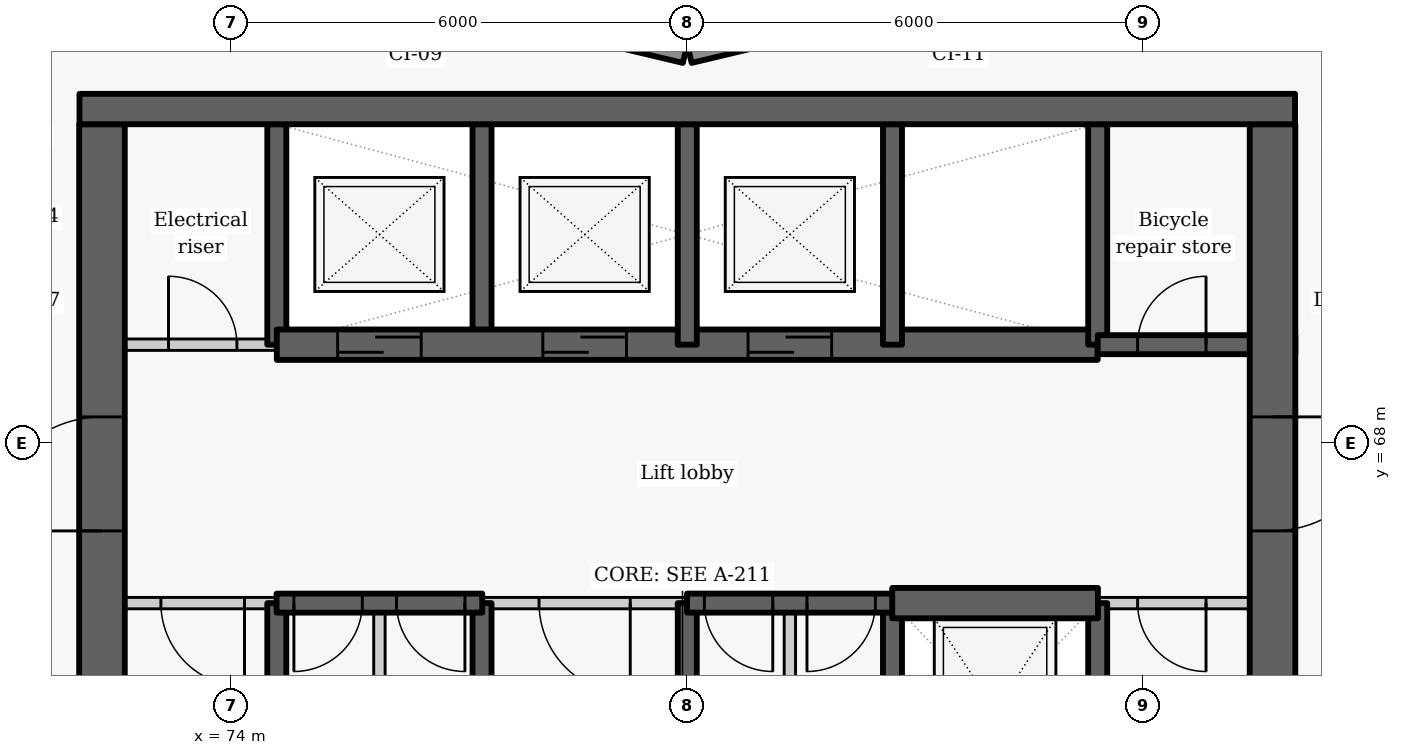
"""IFC4 building model, lengths in metres.
Left out: names, types, materials, properties, quantities, classifications, styles, units other than length and angle.
Written with IfcOpenShell. Run it as: python <this file> out.ifc"""

import sys

from ifc_helpers import new_model, si_unit, direction, frame, frame_2d, origin, place, context, subcontext, project, spatial, rectangle, extrude, element, fill, save


model = new_model("IFC4")
c1 = context("Model", 3, precision=1e-05, world=origin(), true_north=direction((0.0, 1.0)))
c2 = subcontext(c1, "Body", "Model", "MODEL_VIEW")
j1 = project(units=[si_unit("LENGTHUNIT", "METRE"), si_unit("PLANEANGLEUNIT", "RADIAN")], contexts=[c1])
p1 = place(None, origin())
s1 = spatial("IfcSite", under=j1, at=p1, CompositionType="ELEMENT")
p2 = place(p1, origin())
s2 = spatial("IfcBuilding", under=s1, at=p2, CompositionType="ELEMENT")
p3 = place(p2, frame((0.0, 0.0, 41.4)))
s3 = spatial("IfcBuildingStorey", under=s2, at=p3, CompositionType="ELEMENT", Elevation=41.4)
for number, where, z_axis, x_axis in (
    (1, (83.186, 73.881, 0.0), (0.0, 0.0, 1.0), (-0.973, -0.232, 0.0)),
    (2, (79.971, 73.128, 0.0), (0.0, 0.0, 1.0), (-0.973, 0.232, 0.0)),
):
    element("IfcWall", number, at=place(p3, frame(where, z_axis=z_axis, x_axis=x_axis)), inside=s3, PredefinedType="SOLIDWALL", context=c2, shape_type="SweptSolid", body=[
        extrude(rectangle(XDim=3.246, YDim=0.25, at=frame_2d((1.623, 0.0))), origin(), (0.0, 0.0, 1.0), 2.425),
    ])
p4 = place(p3, frame((74.6, 63.1, -0.275), z_axis=(0.0, 0.0, 1.0), x_axis=(0.0, 1.0, 0.0)))
e3 = element("IfcWall", 3, at=p4, inside=s3, PredefinedType="SHEAR", context=c2, shape_type="SweptSolid", body=[
    extrude(rectangle(XDim=2.8, YDim=0.25, at=frame_2d((1.4, 0.0))), origin(), (0.0, 0.0, 1.0), 3.3),
])
p5 = place(p3, frame((74.6, 69.3, -0.275), z_axis=(0.0, 0.0, 1.0), x_axis=(0.0, 1.0, 0.0)))
e4 = element("IfcWall", 4, at=p5, inside=s3, PredefinedType="SHEAR", context=c2, shape_type="SweptSolid", body=[
    extrude(rectangle(XDim=2.9, YDim=0.25, at=frame_2d((1.45, 0.0))), origin(), (0.0, 0.0, 1.0), 3.3),
])
p6 = place(p3, frame((72.0, 69.3, 0.0), z_axis=(0.0, 0.0, 1.0), x_axis=(1.0, 0.0, 0.0)))
e5 = element("IfcWall", 5, at=p6, inside=s3, PredefinedType="PARTITIONING", context=c2, shape_type="SweptSolid", body=[
    extrude(rectangle(XDim=2.6, YDim=0.15, at=frame_2d((1.3, 0.0))), origin(), (0.0, 0.0, 1.0), 3.025),
])
p7 = place(p6, frame((1.175, 0.0, 0.0)))
e6 = element("IfcOpeningElement", 6, at=p7, cuts=e5, PredefinedType="OPENING", context=c2, shape_type="SweptSolid", body=[
    extrude(rectangle(XDim=0.9, YDim=2.1, at=frame_2d((0.45, 1.05))), frame((0.0, 0.085, 0.0), z_axis=(0.0, -1.0, 0.0), x_axis=(1.0, 0.0, 0.0)), (0.0, 0.0, 1.0), 0.17),
])
p8 = place(p3, frame((72.3, 63.1, -0.275), z_axis=(0.0, 0.0, 1.0), x_axis=(0.0, 1.0, 0.0)))
e7 = element("IfcWall", 7, at=p8, inside=s3, PredefinedType="SHEAR", context=c2, shape_type="SweptSolid", body=[
    extrude(rectangle(XDim=9.1, YDim=0.6, at=frame_2d((4.55, 0.0))), origin(), (0.0, 0.0, 1.0), 3.3),
])
p9 = place(p8, frame((3.75, 0.0, 0.275)))
e8 = element("IfcOpeningElement", 8, at=p9, cuts=e7, PredefinedType="OPENING", context=c2, shape_type="SweptSolid", body=[
    extrude(rectangle(XDim=1.5, YDim=2.1, at=frame_2d((0.75, 1.05))), frame((0.0, 0.31, 0.0), z_axis=(0.0, -1.0, 0.0), x_axis=(1.0, 0.0, 0.0)), (0.0, 0.0, 1.0), 0.62),
])
p10 = place(p3, frame((77.3, 63.1, -0.275), z_axis=(0.0, 0.0, 1.0), x_axis=(0.0, 1.0, 0.0)))
e9 = element("IfcWall", 9, at=p10, inside=s3, PredefinedType="SHEAR", context=c2, shape_type="SweptSolid", body=[
    extrude(rectangle(XDim=2.8, YDim=0.25, at=frame_2d((1.4, 0.0))), origin(), (0.0, 0.0, 1.0), 3.3),
])
p11 = place(p3, frame((77.3, 69.3, -0.275), z_axis=(0.0, 0.0, 1.0), x_axis=(0.0, 1.0, 0.0)))
e10 = element("IfcWall", 10, at=p11, inside=s3, PredefinedType="SHEAR", context=c2, shape_type="SweptSolid", body=[
    extrude(rectangle(XDim=2.9, YDim=0.25, at=frame_2d((1.45, 0.0))), origin(), (0.0, 0.0, 1.0), 3.3),
])
p12 = place(p3, frame((74.6, 69.3, -0.275), z_axis=(0.0, 0.0, 1.0), x_axis=(1.0, 0.0, 0.0)))
e11 = element("IfcWall", 11, at=p12, inside=s3, PredefinedType="SHEAR", context=c2, shape_type="SweptSolid", body=[
    extrude(rectangle(XDim=10.8, YDim=0.4, at=frame_2d((5.4, 0.0))), origin(), (0.0, 0.0, 1.0), 3.3),
])
p13 = place(p12, frame((0.8, 0.0, 0.275)))
e12 = element("IfcOpeningElement", 12, at=p13, cuts=e11, PredefinedType="OPENING", context=c2, shape_type="SweptSolid", body=[
    extrude(rectangle(XDim=1.1, YDim=2.1, at=frame_2d((0.55, 1.05))), frame((0.0, 0.21, 0.0), z_axis=(0.0, -1.0, 0.0), x_axis=(1.0, 0.0, 0.0)), (0.0, 0.0, 1.0), 0.42),
])
p14 = place(p12, frame((3.5, 0.0, 0.275)))
e13 = element("IfcOpeningElement", 13, at=p14, cuts=e11, PredefinedType="OPENING", context=c2, shape_type="SweptSolid", body=[
    extrude(rectangle(XDim=1.1, YDim=2.1, at=frame_2d((0.55, 1.05))), frame((0.0, 0.21, 0.0), z_axis=(0.0, -1.0, 0.0), x_axis=(1.0, 0.0, 0.0)), (0.0, 0.0, 1.0), 0.42),
])
p15 = place(p12, frame((6.2, 0.0, 0.275)))
e14 = element("IfcOpeningElement", 14, at=p15, cuts=e11, PredefinedType="OPENING", context=c2, shape_type="SweptSolid", body=[
    extrude(rectangle(XDim=1.1, YDim=2.1, at=frame_2d((0.55, 1.05))), frame((0.0, 0.21, 0.0), z_axis=(0.0, -1.0, 0.0), x_axis=(1.0, 0.0, 0.0)), (0.0, 0.0, 1.0), 0.42),
])
p16 = place(p3, frame((80.0, 63.1, -0.275), z_axis=(0.0, 0.0, 1.0), x_axis=(0.0, 1.0, 0.0)))
e15 = element("IfcWall", 15, at=p16, inside=s3, PredefinedType="SHEAR", context=c2, shape_type="SweptSolid", body=[
    extrude(rectangle(XDim=2.8, YDim=0.25, at=frame_2d((1.4, 0.0))), origin(), (0.0, 0.0, 1.0), 3.3),
])
p17 = place(p3, frame((80.0, 69.3, -0.275), z_axis=(0.0, 0.0, 1.0), x_axis=(0.0, 1.0, 0.0)))
e16 = element("IfcWall", 16, at=p17, inside=s3, PredefinedType="SHEAR", context=c2, shape_type="SweptSolid", body=[
    extrude(rectangle(XDim=2.9, YDim=0.25, at=frame_2d((1.45, 0.0))), origin(), (0.0, 0.0, 1.0), 3.3),
])
p18 = place(p3, frame((82.7, 63.1, -0.275), z_axis=(0.0, 0.0, 1.0), x_axis=(0.0, 1.0, 0.0)))
e17 = element("IfcWall", 17, at=p18, inside=s3, PredefinedType="SHEAR", context=c2, shape_type="SweptSolid", body=[
    extrude(rectangle(XDim=2.8, YDim=0.25, at=frame_2d((1.4, 0.0))), origin(), (0.0, 0.0, 1.0), 3.3),
])
p19 = place(p3, frame((82.7, 69.3, -0.275), z_axis=(0.0, 0.0, 1.0), x_axis=(0.0, 1.0, 0.0)))
e18 = element("IfcWall", 18, at=p19, inside=s3, PredefinedType="SHEAR", context=c2, shape_type="SweptSolid", body=[
    extrude(rectangle(XDim=2.9, YDim=0.25, at=frame_2d((1.45, 0.0))), origin(), (0.0, 0.0, 1.0), 3.3),
])
p20 = place(p3, frame((85.4, 63.1, -0.275), z_axis=(0.0, 0.0, 1.0), x_axis=(0.0, 1.0, 0.0)))
e19 = element("IfcWall", 19, at=p20, inside=s3, PredefinedType="SHEAR", context=c2, shape_type="SweptSolid", body=[
    extrude(rectangle(XDim=2.8, YDim=0.25, at=frame_2d((1.4, 0.0))), origin(), (0.0, 0.0, 1.0), 3.3),
])
p21 = place(p3, frame((85.4, 69.3, -0.275), z_axis=(0.0, 0.0, 1.0), x_axis=(0.0, 1.0, 0.0)))
e20 = element("IfcWall", 20, at=p21, inside=s3, PredefinedType="SHEAR", context=c2, shape_type="SweptSolid", body=[
    extrude(rectangle(XDim=2.9, YDim=0.25, at=frame_2d((1.45, 0.0))), origin(), (0.0, 0.0, 1.0), 3.3),
])
p22 = place(p3, frame((85.4, 69.3, -0.275), z_axis=(0.0, 0.0, 1.0), x_axis=(1.0, 0.0, 0.0)))
e21 = element("IfcWall", 21, at=p22, inside=s3, PredefinedType="SHEAR", context=c2, shape_type="SweptSolid", body=[
    extrude(rectangle(XDim=2.6, YDim=0.25, at=frame_2d((1.3, 0.0))), origin(), (0.0, 0.0, 1.0), 3.3),
])
p23 = place(p22, frame((0.525, 0.0, 0.275)))
e22 = element("IfcOpeningElement", 22, at=p23, cuts=e21, PredefinedType="OPENING", context=c2, shape_type="SweptSolid", body=[
    extrude(rectangle(XDim=0.9, YDim=2.1, at=frame_2d((0.45, 1.05))), frame((0.0, 0.135, 0.0), z_axis=(0.0, -1.0, 0.0), x_axis=(1.0, 0.0, 0.0)), (0.0, 0.0, 1.0), 0.27),
])
p24 = place(p3, frame((87.7, 72.2, -0.275), z_axis=(0.0, 0.0, 1.0), x_axis=(0.0, -1.0, 0.0)))
e23 = element("IfcWall", 23, at=p24, inside=s3, PredefinedType="SHEAR", context=c2, shape_type="SweptSolid", body=[
    extrude(rectangle(XDim=15.6, YDim=0.6, at=frame_2d((7.8, 0.0))), origin(), (0.0, 0.0, 1.0), 3.3),
])
p25 = place(p24, frame((3.85, 0.0, 0.275)))
e24 = element("IfcOpeningElement", 24, at=p25, cuts=e23, PredefinedType="OPENING", context=c2, shape_type="SweptSolid", body=[
    extrude(rectangle(XDim=1.5, YDim=2.1, at=frame_2d((0.75, 1.05))), frame((0.0, 0.31, 0.0), z_axis=(0.0, -1.0, 0.0), x_axis=(1.0, 0.0, 0.0)), (0.0, 0.0, 1.0), 0.62),
])
p26 = place(p24, frame((11.8, 0.0, 0.275)))
e25 = element("IfcOpeningElement", 25, at=p26, cuts=e23, PredefinedType="OPENING", context=c2, shape_type="SweptSolid", body=[
    extrude(rectangle(XDim=1.1, YDim=2.1, at=frame_2d((0.55, 1.05))), frame((0.0, 0.31, 0.0), z_axis=(0.0, -1.0, 0.0), x_axis=(1.0, 0.0, 0.0)), (0.0, 0.0, 1.0), 0.62),
])
p27 = place(p3, frame((74.603, 65.9, 0.0), z_axis=(0.0, 0.0, 1.0), x_axis=(-1.0, 0.0, 0.0)))
e26 = element("IfcWall", 26, at=p27, inside=s3, PredefinedType="PARTITIONING", context=c2, shape_type="SweptSolid", body=[
    extrude(rectangle(XDim=2.603, YDim=0.15, at=frame_2d((1.302, 0.0))), origin(), (0.0, 0.0, 1.0), 3.025),
])
p28 = place(p27, frame((0.428, 0.0, 0.0)))
e27 = element("IfcOpeningElement", 27, at=p28, cuts=e26, PredefinedType="OPENING", context=c2, shape_type="SweptSolid", body=[
    extrude(rectangle(XDim=1.1, YDim=2.1, at=frame_2d((0.55, 1.05))), frame((0.0, 0.085, 0.0), z_axis=(0.0, -1.0, 0.0), x_axis=(1.0, 0.0, 0.0)), (0.0, 0.0, 1.0), 0.17),
])
p29 = place(p3, frame((80.003, 65.9, 0.0), z_axis=(0.0, 0.0, 1.0), x_axis=(-1.0, 0.0, 0.0)))
e28 = element("IfcWall", 28, at=p29, inside=s3, PredefinedType="PARTITIONING", context=c2, shape_type="SweptSolid", body=[
    extrude(rectangle(XDim=2.706, YDim=0.15, at=frame_2d((1.353, 0.0))), origin(), (0.0, 0.0, 1.0), 3.025),
])
p30 = place(p29, frame((0.753, 0.0, 0.0)))
e29 = element("IfcOpeningElement", 29, at=p30, cuts=e28, PredefinedType="OPENING", context=c2, shape_type="SweptSolid", body=[
    extrude(rectangle(XDim=1.2, YDim=2.1, at=frame_2d((0.6, 1.05))), frame((0.0, 0.085, 0.0), z_axis=(0.0, -1.0, 0.0), x_axis=(1.0, 0.0, 0.0)), (0.0, 0.0, 1.0), 0.17),
])
p31 = place(p3, frame((88.0, 65.9, 0.0), z_axis=(0.0, 0.0, 1.0), x_axis=(-1.0, 0.0, 0.0)))
e30 = element("IfcWall", 30, at=p31, inside=s3, PredefinedType="PARTITIONING", context=c2, shape_type="SweptSolid", body=[
    extrude(rectangle(XDim=2.603, YDim=0.15, at=frame_2d((1.302, 0.0))), origin(), (0.0, 0.0, 1.0), 3.025),
])
p32 = place(p31, frame((1.175, 0.0, 0.0)))
e31 = element("IfcOpeningElement", 31, at=p32, cuts=e30, PredefinedType="OPENING", context=c2, shape_type="SweptSolid", body=[
    extrude(rectangle(XDim=0.9, YDim=2.1, at=frame_2d((0.45, 1.05))), frame((0.0, 0.085, 0.0), z_axis=(0.0, -1.0, 0.0), x_axis=(1.0, 0.0, 0.0)), (0.0, 0.0, 1.0), 0.17),
])
p33 = place(p3, frame((77.303, 65.9, -0.275), z_axis=(0.0, 0.0, 1.0), x_axis=(-1.0, 0.0, 0.0)))
e32 = element("IfcWall", 32, at=p33, inside=s3, PredefinedType="SHEAR", context=c2, shape_type="SweptSolid", body=[
    extrude(rectangle(XDim=2.706, YDim=0.25, at=frame_2d((1.353, 0.0))), origin(), (0.0, 0.0, 1.0), 3.3),
])
p34 = place(p33, frame((1.578, 0.0, 0.275)))
e33 = element("IfcOpeningElement", 33, at=p34, cuts=e32, PredefinedType="OPENING", context=c2, shape_type="SweptSolid", body=[
    extrude(rectangle(XDim=0.9, YDim=2.1, at=frame_2d((0.45, 1.05))), frame((0.0, 0.135, 0.0), z_axis=(0.0, -1.0, 0.0), x_axis=(1.0, 0.0, 0.0)), (0.0, 0.0, 1.0), 0.27),
])
p35 = place(p33, frame((0.228, 0.0, 0.275)))
e34 = element("IfcOpeningElement", 34, at=p35, cuts=e32, PredefinedType="OPENING", context=c2, shape_type="SweptSolid", body=[
    extrude(rectangle(XDim=0.9, YDim=2.1, at=frame_2d((0.45, 1.05))), frame((0.0, 0.135, 0.0), z_axis=(0.0, -1.0, 0.0), x_axis=(1.0, 0.0, 0.0)), (0.0, 0.0, 1.0), 0.27),
])
p36 = place(p3, frame((82.703, 65.9, -0.275), z_axis=(0.0, 0.0, 1.0), x_axis=(-1.0, 0.0, 0.0)))
e35 = element("IfcWall", 35, at=p36, inside=s3, PredefinedType="SHEAR", context=c2, shape_type="SweptSolid", body=[
    extrude(rectangle(XDim=2.706, YDim=0.25, at=frame_2d((1.353, 0.0))), origin(), (0.0, 0.0, 1.0), 3.3),
])
p37 = place(p36, frame((1.578, 0.0, 0.275)))
e36 = element("IfcOpeningElement", 36, at=p37, cuts=e35, PredefinedType="OPENING", context=c2, shape_type="SweptSolid", body=[
    extrude(rectangle(XDim=0.9, YDim=2.1, at=frame_2d((0.45, 1.05))), frame((0.0, 0.135, 0.0), z_axis=(0.0, -1.0, 0.0), x_axis=(1.0, 0.0, 0.0)), (0.0, 0.0, 1.0), 0.27),
])
p38 = place(p36, frame((0.228, 0.0, 0.275)))
e37 = element("IfcOpeningElement", 37, at=p38, cuts=e35, PredefinedType="OPENING", context=c2, shape_type="SweptSolid", body=[
    extrude(rectangle(XDim=0.9, YDim=2.1, at=frame_2d((0.45, 1.05))), frame((0.0, 0.135, 0.0), z_axis=(0.0, -1.0, 0.0), x_axis=(1.0, 0.0, 0.0)), (0.0, 0.0, 1.0), 0.27),
])
p39 = place(p3, frame((82.697, 65.9, -0.275), z_axis=(0.0, 0.0, 1.0), x_axis=(1.0, 0.0, 0.0)))
e38 = element("IfcWall", 38, at=p39, inside=s3, PredefinedType="SHEAR", context=c2, shape_type="SweptSolid", body=[
    extrude(rectangle(XDim=2.706, YDim=0.4, at=frame_2d((1.353, 0.0))), origin(), (0.0, 0.0, 1.0), 3.3),
])
for number, where, z_axis, x_axis in (
    (39, (75.95, 63.1, 0.0), (0.0, 0.0, 1.0), (0.0, 1.0, 0.0)),
    (40, (81.35, 63.1, 0.0), (0.0, 0.0, 1.0), (0.0, 1.0, 0.0)),
):
    element("IfcWall", number, at=place(p3, frame(where, z_axis=z_axis, x_axis=x_axis)), inside=s3, PredefinedType="PARTITIONING", context=c2, shape_type="SweptSolid", body=[
        extrude(rectangle(XDim=2.8, YDim=0.15, at=frame_2d((1.4, 0.0))), origin(), (0.0, 0.0, 1.0), 3.025),
    ])
p40 = place(p3, frame((72.004, 72.4, -0.275), z_axis=(0.0, 0.0, 1.0), x_axis=(1.0, 0.0, 0.0)))
e41 = element("IfcWall", 41, at=p40, inside=s3, PredefinedType="SHEAR", context=c2, shape_type="SweptSolid", body=[
    extrude(rectangle(XDim=15.992, YDim=0.4, at=frame_2d((7.996, 0.0))), origin(), (0.0, 0.0, 1.0), 3.3),
])
p41 = place(p7, origin())
e42 = element("IfcDoor", 42, at=p41, inside=s3, OperationType="SINGLE_SWING_LEFT", PredefinedType="DOOR", context=c2, shape_type="SweptSolid", body=[
    extrude(rectangle(XDim=0.9, YDim=2.1, at=frame_2d((0.45, 1.05))), frame((0.0, 0.025, 0.0), z_axis=(0.0, -1.0, 0.0), x_axis=(1.0, 0.0, 0.0)), (0.0, 0.0, 1.0), 0.05),
])
fill(e6, e42)
p42 = place(p13, origin())
e43 = element("IfcDoor", 43, at=p42, inside=s3, OperationType="SLIDING_TO_LEFT", PredefinedType="DOOR", context=c2, shape_type="SweptSolid", body=[
    extrude(rectangle(XDim=1.1, YDim=2.1, at=frame_2d((0.55, 1.05))), frame((0.0, 0.025, 0.0), z_axis=(0.0, -1.0, 0.0), x_axis=(1.0, 0.0, 0.0)), (0.0, 0.0, 1.0), 0.05),
])
fill(e12, e43)
p43 = place(p14, origin())
e44 = element("IfcDoor", 44, at=p43, inside=s3, OperationType="SLIDING_TO_LEFT", PredefinedType="DOOR", context=c2, shape_type="SweptSolid", body=[
    extrude(rectangle(XDim=1.1, YDim=2.1, at=frame_2d((0.55, 1.05))), frame((0.0, 0.025, 0.0), z_axis=(0.0, -1.0, 0.0), x_axis=(1.0, 0.0, 0.0)), (0.0, 0.0, 1.0), 0.05),
])
fill(e13, e44)
p44 = place(p15, origin())
e45 = element("IfcDoor", 45, at=p44, inside=s3, OperationType="SLIDING_TO_LEFT", PredefinedType="DOOR", context=c2, shape_type="SweptSolid", body=[
    extrude(rectangle(XDim=1.1, YDim=2.1, at=frame_2d((0.55, 1.05))), frame((0.0, 0.025, 0.0), z_axis=(0.0, -1.0, 0.0), x_axis=(1.0, 0.0, 0.0)), (0.0, 0.0, 1.0), 0.05),
])
fill(e14, e45)
p45 = place(p23, origin())
e46 = element("IfcDoor", 46, at=p45, inside=s3, OperationType="SINGLE_SWING_RIGHT", PredefinedType="DOOR", context=c2, shape_type="SweptSolid", body=[
    extrude(rectangle(XDim=0.9, YDim=2.1, at=frame_2d((0.45, 1.05))), frame((0.0, 0.025, 0.0), z_axis=(0.0, -1.0, 0.0), x_axis=(1.0, 0.0, 0.0)), (0.0, 0.0, 1.0), 0.05),
])
fill(e22, e46)
p46 = place(p28, origin())
e47 = element("IfcDoor", 47, at=p46, inside=s3, OperationType="SINGLE_SWING_LEFT", PredefinedType="DOOR", context=c2, shape_type="SweptSolid", body=[
    extrude(rectangle(XDim=1.1, YDim=2.1, at=frame_2d((0.55, 1.05))), frame((0.0, 0.025, 0.0), z_axis=(0.0, -1.0, 0.0), x_axis=(1.0, 0.0, 0.0)), (0.0, 0.0, 1.0), 0.05),
])
fill(e27, e47)
p47 = place(p34, origin())
e48 = element("IfcDoor", 48, at=p47, inside=s3, OperationType="SINGLE_SWING_RIGHT", PredefinedType="DOOR", context=c2, shape_type="SweptSolid", body=[
    extrude(rectangle(XDim=0.9, YDim=2.1, at=frame_2d((0.45, 1.05))), frame((0.0, 0.025, 0.0), z_axis=(0.0, -1.0, 0.0), x_axis=(1.0, 0.0, 0.0)), (0.0, 0.0, 1.0), 0.05),
])
fill(e33, e48)
p48 = place(p35, origin())
e49 = element("IfcDoor", 49, at=p48, inside=s3, OperationType="SINGLE_SWING_LEFT", PredefinedType="DOOR", context=c2, shape_type="SweptSolid", body=[
    extrude(rectangle(XDim=0.9, YDim=2.1, at=frame_2d((0.45, 1.05))), frame((0.0, 0.025, 0.0), z_axis=(0.0, -1.0, 0.0), x_axis=(1.0, 0.0, 0.0)), (0.0, 0.0, 1.0), 0.05),
])
fill(e34, e49)
p49 = place(p30, origin())
e50 = element("IfcDoor", 50, at=p49, inside=s3, OperationType="DOUBLE_DOOR_SINGLE_SWING", PredefinedType="DOOR", context=c2, shape_type="SweptSolid", body=[
    extrude(rectangle(XDim=1.2, YDim=2.1, at=frame_2d((0.6, 1.05))), frame((0.0, 0.025, 0.0), z_axis=(0.0, -1.0, 0.0), x_axis=(1.0, 0.0, 0.0)), (0.0, 0.0, 1.0), 0.05),
])
fill(e29, e50)
p50 = place(p37, origin())
e51 = element("IfcDoor", 51, at=p50, inside=s3, OperationType="SINGLE_SWING_LEFT", PredefinedType="DOOR", context=c2, shape_type="SweptSolid", body=[
    extrude(rectangle(XDim=0.9, YDim=2.1, at=frame_2d((0.45, 1.05))), frame((0.0, 0.025, 0.0), z_axis=(0.0, -1.0, 0.0), x_axis=(1.0, 0.0, 0.0)), (0.0, 0.0, 1.0), 0.05),
])
fill(e36, e51)
p51 = place(p38, origin())
e52 = element("IfcDoor", 52, at=p51, inside=s3, OperationType="SINGLE_SWING_RIGHT", PredefinedType="DOOR", context=c2, shape_type="SweptSolid", body=[
    extrude(rectangle(XDim=0.9, YDim=2.1, at=frame_2d((0.45, 1.05))), frame((0.0, 0.025, 0.0), z_axis=(0.0, -1.0, 0.0), x_axis=(1.0, 0.0, 0.0)), (0.0, 0.0, 1.0), 0.05),
])
fill(e37, e52)
p52 = place(p32, origin())
e53 = element("IfcDoor", 53, at=p52, inside=s3, OperationType="SINGLE_SWING_LEFT", PredefinedType="DOOR", context=c2, shape_type="SweptSolid", body=[
    extrude(rectangle(XDim=0.9, YDim=2.1, at=frame_2d((0.45, 1.05))), frame((0.0, 0.025, 0.0), z_axis=(0.0, -1.0, 0.0), x_axis=(1.0, 0.0, 0.0)), (0.0, 0.0, 1.0), 0.05),
])
fill(e31, e53)
p53 = place(p25, origin())
e54 = element("IfcDoor", 54, at=p53, inside=s3, OperationType="DOUBLE_DOOR_SINGLE_SWING", PredefinedType="DOOR", context=c2, shape_type="SweptSolid", body=[
    extrude(rectangle(XDim=1.5, YDim=2.1, at=frame_2d((0.75, 1.05))), frame((0.0, 0.025, 0.0), z_axis=(0.0, -1.0, 0.0), x_axis=(1.0, 0.0, 0.0)), (0.0, 0.0, 1.0), 0.05),
])
fill(e24, e54)
p54 = place(p9, origin())
e55 = element("IfcDoor", 55, at=p54, inside=s3, OperationType="DOUBLE_DOOR_SINGLE_SWING", PredefinedType="DOOR", context=c2, shape_type="SweptSolid", body=[
    extrude(rectangle(XDim=1.5, YDim=2.1, at=frame_2d((0.75, 1.05))), frame((0.0, 0.025, 0.0), z_axis=(0.0, -1.0, 0.0), x_axis=(1.0, 0.0, 0.0)), (0.0, 0.0, 1.0), 0.05),
])
fill(e8, e55)
save(model, sys.argv[1])
